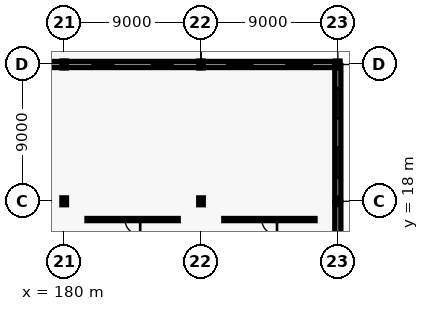
"""IFC4 building model, lengths in metres.
Left out: names, types, materials, properties, quantities, classifications, styles, units other than length and angle.
Written with IfcOpenShell. Run it as: python <this file> out.ifc"""

import sys

from ifc_helpers import new_model, si_unit, direction, frame, frame_2d, origin, origin_2d, place, context, subcontext, project, spatial, rectangle, i_section, extrude, element, fill, save


model = new_model("IFC4")
c1 = context("Model", 3, precision=1e-05, world=origin(), true_north=direction((0.0, 1.0)))
c2 = subcontext(c1, "Body", "Model", "MODEL_VIEW")
j1 = project(units=[si_unit("LENGTHUNIT", "METRE"), si_unit("PLANEANGLEUNIT", "RADIAN")], contexts=[c1])
p1 = place(None, origin())
s1 = spatial("IfcSite", under=j1, at=p1, CompositionType="ELEMENT")
p2 = place(p1, origin())
s2 = spatial("IfcBuilding", under=s1, at=p2, CompositionType="ELEMENT")
p3 = place(p2, origin())
s3 = spatial("IfcBuildingStorey", under=s2, at=p3, CompositionType="ELEMENT", Elevation=0.0)
for number, where, z_axis, x_axis in (
    (1, (180.0, 18.0, 0.0), (0.0, 0.0, 1.0), (1.0, 0.0, 0.0)),
    (2, (180.0, 27.0, 0.0), (0.0, 0.0, 1.0), (1.0, 0.0, 0.0)),
    (3, (189.0, 18.0, 0.0), (0.0, 0.0, 1.0), (1.0, 0.0, 0.0)),
    (4, (189.0, 27.0, 0.0), (0.0, 0.0, 1.0), (1.0, 0.0, 0.0)),
    (5, (198.0, 18.0, 0.0), (0.0, 0.0, 1.0), (1.0, 0.0, 0.0)),
    (6, (198.0, 27.0, 0.0), (0.0, 0.0, 1.0), (1.0, 0.0, 0.0)),
):
    element("IfcColumn", number, at=place(p3, frame(where, z_axis=z_axis, x_axis=x_axis)), inside=s3, PredefinedType="COLUMN", context=c2, shape_type="SweptSolid", body=[
        extrude(i_section(OverallWidth=0.3, OverallDepth=0.45, WebThickness=0.014, FlangeThickness=0.026, FilletRadius=0.027, at=origin_2d()), origin(), (0.0, 0.0, 1.0), 5.4),
    ])
p4 = place(p3, frame((171.06, 27.0, 0.0), z_axis=(0.0, 0.0, 1.0), x_axis=(1.0, 0.0, 0.0)))
e7 = element("IfcWall", 7, at=p4, inside=s3, PredefinedType="SOLIDWALL", context=c2, shape_type="SweptSolid", body=[
    extrude(rectangle(XDim=8.88, YDim=0.4, at=frame_2d((4.44, 0.0))), origin(), (0.0, 0.0, 1.0), 4.7),
])
p5 = place(p4, frame((3.34, 0.0, 0.0)))
e8 = element("IfcOpeningElement", 8, at=p5, cuts=e7, PredefinedType="OPENING", context=c2, shape_type="SweptSolid", body=[
    extrude(rectangle(XDim=2.2, YDim=2.4, at=frame_2d((1.1, 1.2))), frame((0.0, 0.21, 0.0), z_axis=(0.0, -1.0, 0.0), x_axis=(1.0, 0.0, 0.0)), (0.0, 0.0, 1.0), 0.42),
])
p6 = place(p3, frame((180.06, 27.0, 0.0), z_axis=(0.0, 0.0, 1.0), x_axis=(1.0, 0.0, 0.0)))
e9 = element("IfcWall", 9, at=p6, inside=s3, PredefinedType="SOLIDWALL", context=c2, shape_type="SweptSolid", body=[
    extrude(rectangle(XDim=8.88, YDim=0.4, at=frame_2d((4.44, 0.0))), origin(), (0.0, 0.0, 1.0), 4.7),
])
p7 = place(p6, frame((1.811, 0.0, 0.9)))
e10 = element("IfcOpeningElement", 10, at=p7, cuts=e9, PredefinedType="OPENING", context=c2, shape_type="SweptSolid", body=[
    extrude(rectangle(XDim=1.35, YDim=2.15, at=frame_2d((0.675, 1.075))), frame((0.0, 0.21, 0.0), z_axis=(0.0, -1.0, 0.0), x_axis=(1.0, 0.0, 0.0)), (0.0, 0.0, 1.0), 0.42),
])
p8 = place(p6, frame((5.719, 0.0, 0.9)))
e11 = element("IfcOpeningElement", 11, at=p8, cuts=e9, PredefinedType="OPENING", context=c2, shape_type="SweptSolid", body=[
    extrude(rectangle(XDim=1.35, YDim=2.15, at=frame_2d((0.675, 1.075))), frame((0.0, 0.21, 0.0), z_axis=(0.0, -1.0, 0.0), x_axis=(1.0, 0.0, 0.0)), (0.0, 0.0, 1.0), 0.42),
])
p9 = place(p3, frame((189.06, 27.0, 0.0), z_axis=(0.0, 0.0, 1.0), x_axis=(1.0, 0.0, 0.0)))
e12 = element("IfcWall", 12, at=p9, inside=s3, PredefinedType="SOLIDWALL", context=c2, shape_type="SweptSolid", body=[
    extrude(rectangle(XDim=8.88, YDim=0.4, at=frame_2d((4.44, 0.0))), origin(), (0.0, 0.0, 1.0), 4.7),
])
p10 = place(p9, frame((1.661, 0.0, 0.9)))
e13 = element("IfcOpeningElement", 13, at=p10, cuts=e12, PredefinedType="OPENING", context=c2, shape_type="SweptSolid", body=[
    extrude(rectangle(XDim=1.65, YDim=2.3, at=frame_2d((0.825, 1.15))), frame((0.0, 0.21, 0.0), z_axis=(0.0, -1.0, 0.0), x_axis=(1.0, 0.0, 0.0)), (0.0, 0.0, 1.0), 0.42),
])
p11 = place(p9, frame((5.569, 0.0, 0.9)))
e14 = element("IfcOpeningElement", 14, at=p11, cuts=e12, PredefinedType="OPENING", context=c2, shape_type="SweptSolid", body=[
    extrude(rectangle(XDim=1.65, YDim=2.3, at=frame_2d((0.825, 1.15))), frame((0.0, 0.21, 0.0), z_axis=(0.0, -1.0, 0.0), x_axis=(1.0, 0.0, 0.0)), (0.0, 0.0, 1.0), 0.42),
])
p12 = place(p3, frame((198.0, 9.06, 0.0), z_axis=(0.0, 0.0, 1.0), x_axis=(0.0, 1.0, 0.0)))
e15 = element("IfcWall", 15, at=p12, inside=s3, PredefinedType="SOLIDWALL", context=c2, shape_type="SweptSolid", body=[
    extrude(rectangle(XDim=8.88, YDim=0.4, at=frame_2d((4.44, 0.0))), origin(), (0.0, 0.0, 1.0), 4.7),
])
p13 = place(p12, frame((3.54, 0.0, 0.0)))
e16 = element("IfcOpeningElement", 16, at=p13, cuts=e15, PredefinedType="OPENING", context=c2, shape_type="SweptSolid", body=[
    extrude(rectangle(XDim=1.8, YDim=2.2, at=frame_2d((0.9, 1.1))), frame((0.0, 0.21, 0.0), z_axis=(0.0, -1.0, 0.0), x_axis=(1.0, 0.0, 0.0)), (0.0, 0.0, 1.0), 0.42),
])
p14 = place(p3, frame((198.0, 18.06, 0.0), z_axis=(0.0, 0.0, 1.0), x_axis=(0.0, 1.0, 0.0)))
e17 = element("IfcWall", 17, at=p14, inside=s3, PredefinedType="SOLIDWALL", context=c2, shape_type="SweptSolid", body=[
    extrude(rectangle(XDim=8.88, YDim=0.4, at=frame_2d((4.44, 0.0))), origin(), (0.0, 0.0, 1.0), 4.7),
])
p15 = place(p14, frame((1.486, 0.0, 0.9)))
e18 = element("IfcOpeningElement", 18, at=p15, cuts=e17, PredefinedType="OPENING", context=c2, shape_type="SweptSolid", body=[
    extrude(rectangle(XDim=2.0, YDim=2.4, at=frame_2d((1.0, 1.2))), frame((0.0, 0.21, 0.0), z_axis=(0.0, -1.0, 0.0), x_axis=(1.0, 0.0, 0.0)), (0.0, 0.0, 1.0), 0.42),
])
p16 = place(p14, frame((5.394, 0.0, 0.9)))
e19 = element("IfcOpeningElement", 19, at=p16, cuts=e17, PredefinedType="OPENING", context=c2, shape_type="SweptSolid", body=[
    extrude(rectangle(XDim=2.0, YDim=2.4, at=frame_2d((1.0, 1.2))), frame((0.0, 0.21, 0.0), z_axis=(0.0, -1.0, 0.0), x_axis=(1.0, 0.0, 0.0)), (0.0, 0.0, 1.0), 0.42),
])
p17 = place(p3, frame((181.5, 16.8, 0.0), z_axis=(0.0, 0.0, 1.0), x_axis=(1.0, 0.0, 0.0)))
e20 = element("IfcWall", 20, at=p17, inside=s3, PredefinedType="PARTITIONING", context=c2, shape_type="SweptSolid", body=[
    extrude(rectangle(XDim=6.0, YDim=0.14, at=frame_2d((3.0, 0.0))), origin(), (0.0, 0.0, 1.0), 4.3),
])
p18 = place(p17, frame((2.5, 0.0, 0.0)))
e21 = element("IfcOpeningElement", 21, at=p18, cuts=e20, PredefinedType="OPENING", context=c2, shape_type="SweptSolid", body=[
    extrude(rectangle(XDim=1.0, YDim=2.1, at=frame_2d((0.5, 1.05))), frame((0.0, 0.08, 0.0), z_axis=(0.0, -1.0, 0.0), x_axis=(1.0, 0.0, 0.0)), (0.0, 0.0, 1.0), 0.16),
])
p19 = place(p3, frame((190.5, 16.8, 0.0), z_axis=(0.0, 0.0, 1.0), x_axis=(1.0, 0.0, 0.0)))
e22 = element("IfcWall", 22, at=p19, inside=s3, PredefinedType="PARTITIONING", context=c2, shape_type="SweptSolid", body=[
    extrude(rectangle(XDim=6.0, YDim=0.14, at=frame_2d((3.0, 0.0))), origin(), (0.0, 0.0, 1.0), 4.3),
])
p20 = place(p19, frame((2.5, 0.0, 0.0)))
e23 = element("IfcOpeningElement", 23, at=p20, cuts=e22, PredefinedType="OPENING", context=c2, shape_type="SweptSolid", body=[
    extrude(rectangle(XDim=1.0, YDim=2.1, at=frame_2d((0.5, 1.05))), frame((0.0, 0.08, 0.0), z_axis=(0.0, -1.0, 0.0), x_axis=(1.0, 0.0, 0.0)), (0.0, 0.0, 1.0), 0.16),
])
p21 = place(p7, origin())
e24 = element("IfcWindow", 24, at=p21, inside=s3, PartitioningType="SINGLE_PANEL", PredefinedType="WINDOW", context=c2, shape_type="SweptSolid", body=[
    extrude(rectangle(XDim=1.35, YDim=2.15, at=frame_2d((0.675, 1.075))), frame((0.0, 0.03, 0.0), z_axis=(0.0, -1.0, 0.0), x_axis=(1.0, 0.0, 0.0)), (0.0, 0.0, 1.0), 0.06),
])
fill(e10, e24)
p22 = place(p8, origin())
e25 = element("IfcWindow", 25, at=p22, inside=s3, PartitioningType="SINGLE_PANEL", PredefinedType="WINDOW", context=c2, shape_type="SweptSolid", body=[
    extrude(rectangle(XDim=1.35, YDim=2.15, at=frame_2d((0.675, 1.075))), frame((0.0, 0.03, 0.0), z_axis=(0.0, -1.0, 0.0), x_axis=(1.0, 0.0, 0.0)), (0.0, 0.0, 1.0), 0.06),
])
fill(e11, e25)
p23 = place(p10, origin())
e26 = element("IfcWindow", 26, at=p23, inside=s3, PartitioningType="SINGLE_PANEL", PredefinedType="WINDOW", context=c2, shape_type="SweptSolid", body=[
    extrude(rectangle(XDim=1.65, YDim=2.3, at=frame_2d((0.825, 1.15))), frame((0.0, 0.03, 0.0), z_axis=(0.0, -1.0, 0.0), x_axis=(1.0, 0.0, 0.0)), (0.0, 0.0, 1.0), 0.06),
])
fill(e13, e26)
p24 = place(p11, origin())
e27 = element("IfcWindow", 27, at=p24, inside=s3, PartitioningType="SINGLE_PANEL", PredefinedType="WINDOW", context=c2, shape_type="SweptSolid", body=[
    extrude(rectangle(XDim=1.65, YDim=2.3, at=frame_2d((0.825, 1.15))), frame((0.0, 0.03, 0.0), z_axis=(0.0, -1.0, 0.0), x_axis=(1.0, 0.0, 0.0)), (0.0, 0.0, 1.0), 0.06),
])
fill(e14, e27)
p25 = place(p15, origin())
e28 = element("IfcWindow", 28, at=p25, inside=s3, PartitioningType="SINGLE_PANEL", PredefinedType="WINDOW", context=c2, shape_type="SweptSolid", body=[
    extrude(rectangle(XDim=2.0, YDim=2.4, at=frame_2d((1.0, 1.2))), frame((0.0, 0.03, 0.0), z_axis=(0.0, -1.0, 0.0), x_axis=(1.0, 0.0, 0.0)), (0.0, 0.0, 1.0), 0.06),
])
fill(e18, e28)
p26 = place(p16, origin())
e29 = element("IfcWindow", 29, at=p26, inside=s3, PartitioningType="SINGLE_PANEL", PredefinedType="WINDOW", context=c2, shape_type="SweptSolid", body=[
    extrude(rectangle(XDim=2.0, YDim=2.4, at=frame_2d((1.0, 1.2))), frame((0.0, 0.03, 0.0), z_axis=(0.0, -1.0, 0.0), x_axis=(1.0, 0.0, 0.0)), (0.0, 0.0, 1.0), 0.06),
])
fill(e19, e29)
p27 = place(p18, origin())
e30 = element("IfcDoor", 30, at=p27, inside=s3, OperationType="SINGLE_SWING_RIGHT", PredefinedType="DOOR", context=c2, shape_type="SweptSolid", body=[
    extrude(rectangle(XDim=1.0, YDim=2.1, at=frame_2d((0.5, 1.05))), frame((0.0, 0.025, 0.0), z_axis=(0.0, -1.0, 0.0), x_axis=(1.0, 0.0, 0.0)), (0.0, 0.0, 1.0), 0.05),
])
fill(e21, e30)
p28 = place(p20, origin())
e31 = element("IfcDoor", 31, at=p28, inside=s3, OperationType="SINGLE_SWING_RIGHT", PredefinedType="DOOR", context=c2, shape_type="SweptSolid", body=[
    extrude(rectangle(XDim=1.0, YDim=2.1, at=frame_2d((0.5, 1.05))), frame((0.0, 0.025, 0.0), z_axis=(0.0, -1.0, 0.0), x_axis=(1.0, 0.0, 0.0)), (0.0, 0.0, 1.0), 0.05),
])
fill(e23, e31)
save(model, sys.argv[1])
